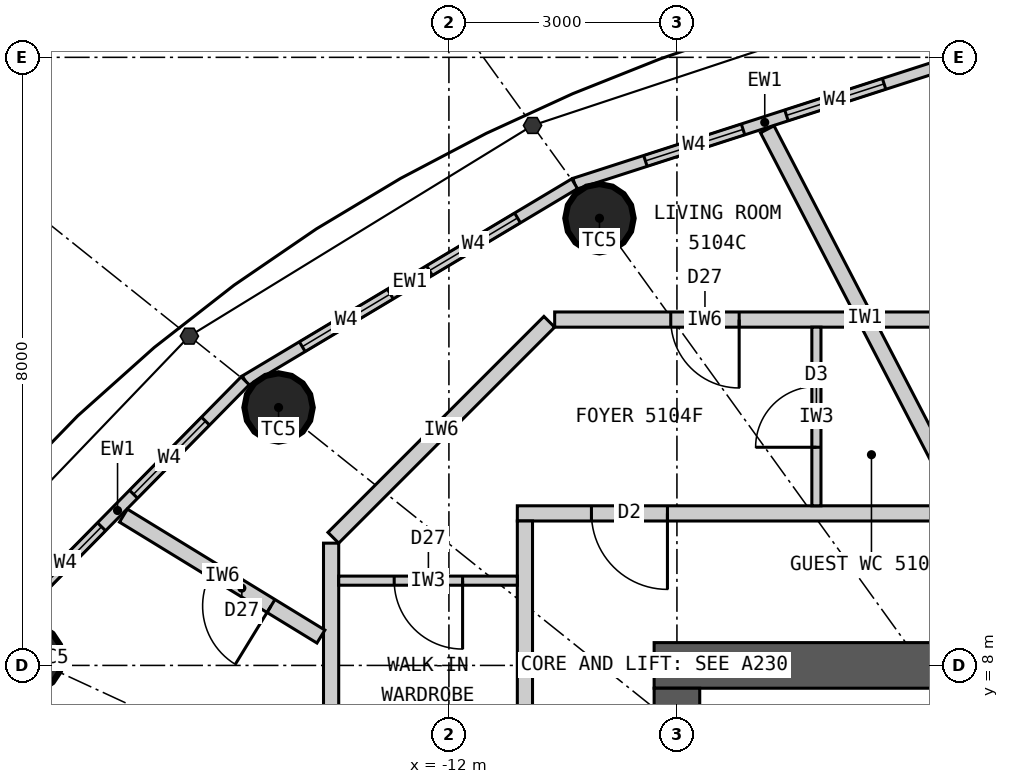
"""IFC4 building model, lengths in metres.
Left out: names, types, materials, properties, quantities, classifications, styles, units other than length and angle.
Written with IfcOpenShell. Run it as: python <this file> out.ifc"""

import sys

from ifc_helpers import new_model, si_unit, direction, frame, frame_2d, origin, origin_2d, place, context, subcontext, project, spatial, rectangle, circle, extrude, element, fill, save


model = new_model("IFC4")
c1 = context("Model", 3, precision=1e-05, world=origin(), true_north=direction((0.0, 1.0)))
c2 = subcontext(c1, "Body", "Model", "MODEL_VIEW")
j1 = project(units=[si_unit("LENGTHUNIT", "METRE"), si_unit("PLANEANGLEUNIT", "RADIAN")], contexts=[c1])
p1 = place(None, origin())
s1 = spatial("IfcSite", under=j1, at=p1, CompositionType="ELEMENT")
p2 = place(p1, origin())
s2 = spatial("IfcBuilding", under=s1, at=p2, CompositionType="ELEMENT")
p3 = place(p2, frame((0.0, 0.0, 192.9)))
s3 = spatial("IfcBuildingStorey", under=s2, at=p3, CompositionType="ELEMENT", Elevation=192.9)
for number, where, z_axis, x_axis in (
    (1, (-10.019, 13.883, 0.0), (0.0, 0.0, 1.0), (1.0, 0.0, 0.0)),
    (2, (-14.241, 11.393, 0.0), (0.0, 0.0, 1.0), (1.0, 0.0, 0.0)),
    (3, (-17.532, 8.098, 0.0), (0.0, 0.0, 1.0), (1.0, 0.0, 0.0)),
):
    element("IfcColumn", number, at=place(p3, frame(where, z_axis=z_axis, x_axis=x_axis)), inside=s3, PredefinedType="COLUMN", context=c2, shape_type="SweptSolid", body=[
        extrude(circle(Radius=0.45, at=origin_2d()), origin(), (0.0, 0.0, 1.0), 3.3),
    ])
p4 = place(p3, frame((-9.3, 8.0, 0.0), z_axis=(0.0, 0.0, 1.0), x_axis=(1.0, 0.0, 0.0)))
e4 = element("IfcWall", 4, at=p4, inside=s3, PredefinedType="SHEAR", context=c2, shape_type="SweptSolid", body=[
    extrude(rectangle(XDim=18.6, YDim=0.6, at=frame_2d((9.3, 0.0))), origin(), (0.0, 0.0, 1.0), 3.3),
])
p5 = place(p4, frame((8.0, 0.0, 0.0)))
e5 = element("IfcOpeningElement", 5, at=p5, cuts=e4, PredefinedType="OPENING", context=c2, shape_type="SweptSolid", body=[
    extrude(rectangle(XDim=1.2, YDim=2.2, at=frame_2d((0.6, 1.1))), frame((0.0, 0.31, 0.0), z_axis=(0.0, -1.0, 0.0), x_axis=(1.0, 0.0, 0.0)), (0.0, 0.0, 1.0), 0.62),
])
p6 = place(p4, frame((15.6, 0.0, 0.0)))
e6 = element("IfcOpeningElement", 6, at=p6, cuts=e4, PredefinedType="OPENING", context=c2, shape_type="SweptSolid", body=[
    extrude(rectangle(XDim=0.9, YDim=2.2, at=frame_2d((0.45, 1.1))), frame((0.0, 0.31, 0.0), z_axis=(0.0, -1.0, 0.0), x_axis=(1.0, 0.0, 0.0)), (0.0, 0.0, 1.0), 0.62),
])
p7 = place(p3, frame((-9.0, 7.7, 0.0), z_axis=(0.0, 0.0, 1.0), x_axis=(0.0, -1.0, 0.0)))
e7 = element("IfcWall", 7, at=p7, inside=s3, PredefinedType="SHEAR", context=c2, shape_type="SweptSolid", body=[
    extrude(rectangle(XDim=15.4, YDim=0.6, at=frame_2d((7.7, 0.0))), origin(), (0.0, 0.0, 1.0), 3.3),
])
p8 = place(p7, frame((6.8, 0.0, 0.0)))
e8 = element("IfcOpeningElement", 8, at=p8, cuts=e7, PredefinedType="OPENING", context=c2, shape_type="SweptSolid", body=[
    extrude(rectangle(XDim=1.8, YDim=2.2, at=frame_2d((0.9, 1.1))), frame((0.0, 0.31, 0.0), z_axis=(0.0, -1.0, 0.0), x_axis=(1.0, 0.0, 0.0)), (0.0, 0.0, 1.0), 0.62),
])
p9 = place(p3, frame((-5.343, 15.952, 0.0), z_axis=(0.0, 0.0, 1.0), x_axis=(-0.951644702515, -0.307200846638, 0.0)))
e9 = element("IfcWall", 9, at=p9, inside=s3, PredefinedType="ELEMENTEDWALL", context=c2, shape_type="SweptSolid", body=[
    extrude(rectangle(XDim=5.258, YDim=0.15, at=frame_2d((2.629, 0.0))), origin(), (0.0, 0.0, 1.0), 3.12),
])
p10 = place(p9, frame((0.979, 0.0, 0.9)))
e10 = element("IfcOpeningElement", 10, at=p10, cuts=e9, PredefinedType="OPENING", context=c2, shape_type="SweptSolid", body=[
    extrude(rectangle(XDim=1.35, YDim=1.9, at=frame_2d((0.675, 0.95))), frame((0.0, 0.085, 0.0), z_axis=(0.0, -1.0, 0.0), x_axis=(1.0, 0.0, 0.0)), (0.0, 0.0, 1.0), 0.17),
])
p11 = place(p9, frame((2.929, 0.0, 0.9)))
e11 = element("IfcOpeningElement", 11, at=p11, cuts=e9, PredefinedType="OPENING", context=c2, shape_type="SweptSolid", body=[
    extrude(rectangle(XDim=1.35, YDim=1.9, at=frame_2d((0.675, 0.95))), frame((0.0, 0.085, 0.0), z_axis=(0.0, -1.0, 0.0), x_axis=(1.0, 0.0, 0.0)), (0.0, 0.0, 1.0), 0.17),
])
p12 = place(p3, frame((-10.346, 14.336, 0.0), z_axis=(0.0, 0.0, 1.0), x_axis=(-0.85822150553, -0.513279502265, 0.0)))
e12 = element("IfcWall", 12, at=p12, inside=s3, PredefinedType="ELEMENTEDWALL", context=c2, shape_type="SweptSolid", body=[
    extrude(rectangle(XDim=5.05, YDim=0.15, at=frame_2d((2.525, 0.0))), origin(), (0.0, 0.0, 1.0), 3.12),
])
p13 = place(p12, frame((0.875, 0.0, 0.9)))
e13 = element("IfcOpeningElement", 13, at=p13, cuts=e12, PredefinedType="OPENING", context=c2, shape_type="SweptSolid", body=[
    extrude(rectangle(XDim=1.35, YDim=1.9, at=frame_2d((0.675, 0.95))), frame((0.0, 0.085, 0.0), z_axis=(0.0, -1.0, 0.0), x_axis=(1.0, 0.0, 0.0)), (0.0, 0.0, 1.0), 0.17),
])
p14 = place(p12, frame((2.825, 0.0, 0.9)))
e14 = element("IfcOpeningElement", 14, at=p14, cuts=e12, PredefinedType="OPENING", context=c2, shape_type="SweptSolid", body=[
    extrude(rectangle(XDim=1.35, YDim=1.9, at=frame_2d((0.675, 0.95))), frame((0.0, 0.085, 0.0), z_axis=(0.0, -1.0, 0.0), x_axis=(1.0, 0.0, 0.0)), (0.0, 0.0, 1.0), 0.17),
])
p15 = place(p3, frame((-14.68, 11.744, 0.0), z_axis=(0.0, 0.0, 1.0), x_axis=(-0.701527379618, -0.712642501993, 0.0)))
e15 = element("IfcWall", 15, at=p15, inside=s3, PredefinedType="ELEMENTEDWALL", context=c2, shape_type="SweptSolid", body=[
    extrude(rectangle(XDim=4.788, YDim=0.15, at=frame_2d((2.394, 0.0))), origin(), (0.0, 0.0, 1.0), 3.12),
])
p16 = place(p15, frame((0.744, 0.0, 0.9)))
e16 = element("IfcOpeningElement", 16, at=p16, cuts=e15, PredefinedType="OPENING", context=c2, shape_type="SweptSolid", body=[
    extrude(rectangle(XDim=1.35, YDim=1.9, at=frame_2d((0.675, 0.95))), frame((0.0, 0.085, 0.0), z_axis=(0.0, -1.0, 0.0), x_axis=(1.0, 0.0, 0.0)), (0.0, 0.0, 1.0), 0.17),
])
p17 = place(p15, frame((2.694, 0.0, 0.9)))
e17 = element("IfcOpeningElement", 17, at=p17, cuts=e15, PredefinedType="OPENING", context=c2, shape_type="SweptSolid", body=[
    extrude(rectangle(XDim=1.35, YDim=1.9, at=frame_2d((0.675, 0.95))), frame((0.0, 0.085, 0.0), z_axis=(0.0, -1.0, 0.0), x_axis=(1.0, 0.0, 0.0)), (0.0, 0.0, 1.0), 0.17),
])
p18 = place(p3, frame((-11.1, 10.0, 0.0), z_axis=(0.0, 0.0, 1.0), x_axis=(1.0, 0.0, 0.0)))
e18 = element("IfcWall", 18, at=p18, inside=s3, PredefinedType="PARTITIONING", context=c2, shape_type="SweptSolid", body=[
    extrude(rectangle(XDim=22.2, YDim=0.2, at=frame_2d((11.1, 0.0))), origin(), (0.0, 0.0, 1.0), 3.12),
])
p19 = place(p18, frame((11.36, 0.0, 0.0)))
e19 = element("IfcOpeningElement", 19, at=p19, cuts=e18, PredefinedType="OPENING", context=c2, shape_type="SweptSolid", body=[
    extrude(rectangle(XDim=1.0, YDim=2.2, at=frame_2d((0.5, 1.1))), frame((0.0, 0.11, 0.0), z_axis=(0.0, -1.0, 0.0), x_axis=(1.0, 0.0, 0.0)), (0.0, 0.0, 1.0), 0.22),
])
p20 = place(p18, frame((0.975, 0.0, 0.0)))
e20 = element("IfcOpeningElement", 20, at=p20, cuts=e18, PredefinedType="OPENING", context=c2, shape_type="SweptSolid", body=[
    extrude(rectangle(XDim=1.0, YDim=2.2, at=frame_2d((0.5, 1.1))), frame((0.0, 0.11, 0.0), z_axis=(0.0, -1.0, 0.0), x_axis=(1.0, 0.0, 0.0)), (0.0, 0.0, 1.0), 0.22),
])
p21 = place(p3, frame((-11.0, 9.9, 0.0), z_axis=(0.0, 0.0, 1.0), x_axis=(0.0, -1.0, 0.0)))
e21 = element("IfcWall", 21, at=p21, inside=s3, PredefinedType="PARTITIONING", context=c2, shape_type="SweptSolid", body=[
    extrude(rectangle(XDim=19.8, YDim=0.2, at=frame_2d((9.9, 0.0))), origin(), (0.0, 0.0, 1.0), 3.12),
])
p22 = place(p21, frame((9.495, 0.0, 0.0)))
e22 = element("IfcOpeningElement", 22, at=p22, cuts=e21, PredefinedType="OPENING", context=c2, shape_type="SweptSolid", body=[
    extrude(rectangle(XDim=1.0, YDim=2.2, at=frame_2d((0.5, 1.1))), frame((0.0, 0.11, 0.0), z_axis=(0.0, -1.0, 0.0), x_axis=(1.0, 0.0, 0.0)), (0.0, 0.0, 1.0), 0.22),
])
p23 = place(p3, frame((-5.241, 10.1, 0.0), z_axis=(0.0, 0.0, 1.0), x_axis=(-0.460603196597, 0.887606160008, 0.0)))
e23 = element("IfcWall", 23, at=p23, inside=s3, PredefinedType="PARTITIONING", context=c2, shape_type="SweptSolid", body=[
    extrude(rectangle(XDim=5.58, YDim=0.2, at=frame_2d((2.79, 0.0))), origin(), (0.0, 0.0, 1.0), 3.12),
])
p24 = place(p3, frame((4.082, 12.55, 0.0), z_axis=(0.0, 0.0, 1.0), x_axis=(-1.0, 0.0, 0.0)))
e24 = element("IfcWall", 24, at=p24, inside=s3, PredefinedType="PARTITIONING", context=c2, shape_type="SweptSolid", body=[
    extrude(rectangle(XDim=10.446, YDim=0.2, at=frame_2d((5.223, 0.0))), origin(), (0.0, 0.0, 1.0), 3.12),
])
p25 = place(p24, frame((6.757, 0.0, 0.0)))
e25 = element("IfcOpeningElement", 25, at=p25, cuts=e24, PredefinedType="OPENING", context=c2, shape_type="SweptSolid", body=[
    extrude(rectangle(XDim=0.8, YDim=2.1, at=frame_2d((0.4, 1.05))), frame((0.0, 0.11, 0.0), z_axis=(0.0, -1.0, 0.0), x_axis=(1.0, 0.0, 0.0)), (0.0, 0.0, 1.0), 0.22),
])
p26 = place(p24, frame((3.372, 0.0, 0.0)))
e26 = element("IfcOpeningElement", 26, at=p26, cuts=e24, PredefinedType="OPENING", context=c2, shape_type="SweptSolid", body=[
    extrude(rectangle(XDim=0.9, YDim=2.1, at=frame_2d((0.45, 1.05))), frame((0.0, 0.11, 0.0), z_axis=(0.0, -1.0, 0.0), x_axis=(1.0, 0.0, 0.0)), (0.0, 0.0, 1.0), 0.22),
])
p27 = place(p3, frame((-6.661, 12.55, 0.0), z_axis=(0.0, 0.0, 1.0), x_axis=(-1.0, 0.0, 0.0)))
e27 = element("IfcWall", 27, at=p27, inside=s3, PredefinedType="PARTITIONING", context=c2, shape_type="SweptSolid", body=[
    extrude(rectangle(XDim=3.947, YDim=0.2, at=frame_2d((1.974, 0.0))), origin(), (0.0, 0.0, 1.0), 3.12),
])
p28 = place(p27, frame((1.52, 0.0, 0.0)))
e28 = element("IfcOpeningElement", 28, at=p28, cuts=e27, PredefinedType="OPENING", context=c2, shape_type="SweptSolid", body=[
    extrude(rectangle(XDim=0.9, YDim=2.1, at=frame_2d((0.45, 1.05))), frame((0.0, 0.11, 0.0), z_axis=(0.0, -1.0, 0.0), x_axis=(1.0, 0.0, 0.0)), (0.0, 0.0, 1.0), 0.22),
])
p29 = place(p3, frame((-10.679, 12.521, 0.0), z_axis=(0.0, 0.0, 1.0), x_axis=(-0.707106781187, -0.707106781187, 0.0)))
e29 = element("IfcWall", 29, at=p29, inside=s3, PredefinedType="PARTITIONING", context=c2, shape_type="SweptSolid", body=[
    extrude(rectangle(XDim=4.019, YDim=0.2, at=frame_2d((2.009, 0.0))), origin(), (0.0, 0.0, 1.0), 3.12),
])
p30 = place(p3, frame((-13.55, 9.609, 0.0), z_axis=(0.0, 0.0, 1.0), x_axis=(0.0, -1.0, 0.0)))
e30 = element("IfcWall", 30, at=p30, inside=s3, PredefinedType="PARTITIONING", context=c2, shape_type="SweptSolid", body=[
    extrude(rectangle(XDim=6.596, YDim=0.2, at=frame_2d((3.298, 0.0))), origin(), (0.0, 0.0, 1.0), 3.12),
])
p31 = place(p30, frame((3.697, 0.0, 0.0)))
e31 = element("IfcOpeningElement", 31, at=p31, cuts=e30, PredefinedType="OPENING", context=c2, shape_type="SweptSolid", body=[
    extrude(rectangle(XDim=0.8, YDim=2.1, at=frame_2d((0.4, 1.05))), frame((0.0, 0.11, 0.0), z_axis=(0.0, -1.0, 0.0), x_axis=(1.0, 0.0, 0.0)), (0.0, 0.0, 1.0), 0.22),
])
p32 = place(p3, frame((-13.684, 8.38, 0.0), z_axis=(0.0, 0.0, 1.0), x_axis=(-0.852784302627, 0.522263279576, 0.0)))
e32 = element("IfcWall", 32, at=p32, inside=s3, PredefinedType="PARTITIONING", context=c2, shape_type="SweptSolid", body=[
    extrude(rectangle(XDim=3.047, YDim=0.2, at=frame_2d((1.523, 0.0))), origin(), (0.0, 0.0, 1.0), 3.12),
])
p33 = place(p32, frame((0.77, 0.0, 0.0)))
e33 = element("IfcOpeningElement", 33, at=p33, cuts=e32, PredefinedType="OPENING", context=c2, shape_type="SweptSolid", body=[
    extrude(rectangle(XDim=0.9, YDim=2.1, at=frame_2d((0.45, 1.05))), frame((0.0, 0.11, 0.0), z_axis=(0.0, -1.0, 0.0), x_axis=(1.0, 0.0, 0.0)), (0.0, 0.0, 1.0), 0.22),
])
p34 = place(p3, frame((-7.165, 10.1, 0.0), z_axis=(0.0, 0.0, 1.0), x_axis=(0.0, 1.0, 0.0)))
e34 = element("IfcWall", 34, at=p34, inside=s3, PredefinedType="PARTITIONING", context=c2, shape_type="SweptSolid", body=[
    extrude(rectangle(XDim=2.35, YDim=0.12, at=frame_2d((1.175, 0.0))), origin(), (0.0, 0.0, 1.0), 3.12),
])
p35 = place(p34, frame((0.77, 0.0, 0.0)))
e35 = element("IfcOpeningElement", 35, at=p35, cuts=e34, PredefinedType="OPENING", context=c2, shape_type="SweptSolid", body=[
    extrude(rectangle(XDim=0.8, YDim=2.1, at=frame_2d((0.4, 1.05))), frame((0.0, 0.07, 0.0), z_axis=(0.0, -1.0, 0.0), x_axis=(1.0, 0.0, 0.0)), (0.0, 0.0, 1.0), 0.14),
])
p36 = place(p3, frame((-11.1, 9.115, 0.0), z_axis=(0.0, 0.0, 1.0), x_axis=(-1.0, 0.0, 0.0)))
e36 = element("IfcWall", 36, at=p36, inside=s3, PredefinedType="PARTITIONING", context=c2, shape_type="SweptSolid", body=[
    extrude(rectangle(XDim=2.35, YDim=0.12, at=frame_2d((1.175, 0.0))), origin(), (0.0, 0.0, 1.0), 3.12),
])
p37 = place(p36, frame((0.72, 0.0, 0.0)))
e37 = element("IfcOpeningElement", 37, at=p37, cuts=e36, PredefinedType="OPENING", context=c2, shape_type="SweptSolid", body=[
    extrude(rectangle(XDim=0.9, YDim=2.1, at=frame_2d((0.45, 1.05))), frame((0.0, 0.07, 0.0), z_axis=(0.0, -1.0, 0.0), x_axis=(1.0, 0.0, 0.0)), (0.0, 0.0, 1.0), 0.14),
])
p38 = place(p10, origin())
e38 = element("IfcWindow", 38, at=p38, inside=s3, PartitioningType="SINGLE_PANEL", PredefinedType="WINDOW", context=c2, shape_type="SweptSolid", body=[
    extrude(rectangle(XDim=1.35, YDim=1.9, at=frame_2d((0.675, 0.95))), frame((0.0, 0.03, 0.0), z_axis=(0.0, -1.0, 0.0), x_axis=(1.0, 0.0, 0.0)), (0.0, 0.0, 1.0), 0.06),
])
fill(e10, e38)
p39 = place(p11, origin())
e39 = element("IfcWindow", 39, at=p39, inside=s3, PartitioningType="SINGLE_PANEL", PredefinedType="WINDOW", context=c2, shape_type="SweptSolid", body=[
    extrude(rectangle(XDim=1.35, YDim=1.9, at=frame_2d((0.675, 0.95))), frame((0.0, 0.03, 0.0), z_axis=(0.0, -1.0, 0.0), x_axis=(1.0, 0.0, 0.0)), (0.0, 0.0, 1.0), 0.06),
])
fill(e11, e39)
p40 = place(p13, origin())
e40 = element("IfcWindow", 40, at=p40, inside=s3, PartitioningType="SINGLE_PANEL", PredefinedType="WINDOW", context=c2, shape_type="SweptSolid", body=[
    extrude(rectangle(XDim=1.35, YDim=1.9, at=frame_2d((0.675, 0.95))), frame((0.0, 0.03, 0.0), z_axis=(0.0, -1.0, 0.0), x_axis=(1.0, 0.0, 0.0)), (0.0, 0.0, 1.0), 0.06),
])
fill(e13, e40)
p41 = place(p14, origin())
e41 = element("IfcWindow", 41, at=p41, inside=s3, PartitioningType="SINGLE_PANEL", PredefinedType="WINDOW", context=c2, shape_type="SweptSolid", body=[
    extrude(rectangle(XDim=1.35, YDim=1.9, at=frame_2d((0.675, 0.95))), frame((0.0, 0.03, 0.0), z_axis=(0.0, -1.0, 0.0), x_axis=(1.0, 0.0, 0.0)), (0.0, 0.0, 1.0), 0.06),
])
fill(e14, e41)
p42 = place(p16, origin())
e42 = element("IfcWindow", 42, at=p42, inside=s3, PartitioningType="SINGLE_PANEL", PredefinedType="WINDOW", context=c2, shape_type="SweptSolid", body=[
    extrude(rectangle(XDim=1.35, YDim=1.9, at=frame_2d((0.675, 0.95))), frame((0.0, 0.03, 0.0), z_axis=(0.0, -1.0, 0.0), x_axis=(1.0, 0.0, 0.0)), (0.0, 0.0, 1.0), 0.06),
])
fill(e16, e42)
p43 = place(p17, origin())
e43 = element("IfcWindow", 43, at=p43, inside=s3, PartitioningType="SINGLE_PANEL", PredefinedType="WINDOW", context=c2, shape_type="SweptSolid", body=[
    extrude(rectangle(XDim=1.35, YDim=1.9, at=frame_2d((0.675, 0.95))), frame((0.0, 0.03, 0.0), z_axis=(0.0, -1.0, 0.0), x_axis=(1.0, 0.0, 0.0)), (0.0, 0.0, 1.0), 0.06),
])
fill(e17, e43)
p44 = place(p20, origin())
e44 = element("IfcDoor", 44, at=p44, inside=s3, OperationType="SINGLE_SWING_RIGHT", PredefinedType="DOOR", context=c2, shape_type="SweptSolid", body=[
    extrude(rectangle(XDim=1.0, YDim=2.2, at=frame_2d((0.5, 1.1))), frame((0.0, 0.025, 0.0), z_axis=(0.0, -1.0, 0.0), x_axis=(1.0, 0.0, 0.0)), (0.0, 0.0, 1.0), 0.05),
])
fill(e20, e44)
p45 = place(p35, origin())
e45 = element("IfcDoor", 45, at=p45, inside=s3, OperationType="SINGLE_SWING_LEFT", PredefinedType="DOOR", context=c2, shape_type="SweptSolid", body=[
    extrude(rectangle(XDim=0.8, YDim=2.1, at=frame_2d((0.4, 1.05))), frame((0.0, 0.025, 0.0), z_axis=(0.0, -1.0, 0.0), x_axis=(1.0, 0.0, 0.0)), (0.0, 0.0, 1.0), 0.05),
])
fill(e35, e45)
p46 = place(p37, origin())
e46 = element("IfcDoor", 46, at=p46, inside=s3, OperationType="SINGLE_SWING_LEFT", PredefinedType="DOOR", context=c2, shape_type="SweptSolid", body=[
    extrude(rectangle(XDim=0.9, YDim=2.1, at=frame_2d((0.45, 1.05))), frame((0.0, 0.025, 0.0), z_axis=(0.0, -1.0, 0.0), x_axis=(1.0, 0.0, 0.0)), (0.0, 0.0, 1.0), 0.05),
])
fill(e37, e46)
p47 = place(p28, origin())
e47 = element("IfcDoor", 47, at=p47, inside=s3, OperationType="SINGLE_SWING_LEFT", PredefinedType="DOOR", context=c2, shape_type="SweptSolid", body=[
    extrude(rectangle(XDim=0.9, YDim=2.1, at=frame_2d((0.45, 1.05))), frame((0.0, 0.025, 0.0), z_axis=(0.0, -1.0, 0.0), x_axis=(1.0, 0.0, 0.0)), (0.0, 0.0, 1.0), 0.05),
])
fill(e28, e47)
p48 = place(p33, origin())
e48 = element("IfcDoor", 48, at=p48, inside=s3, OperationType="SINGLE_SWING_LEFT", PredefinedType="DOOR", context=c2, shape_type="SweptSolid", body=[
    extrude(rectangle(XDim=0.9, YDim=2.1, at=frame_2d((0.45, 1.05))), frame((0.0, 0.025, 0.0), z_axis=(0.0, -1.0, 0.0), x_axis=(1.0, 0.0, 0.0)), (0.0, 0.0, 1.0), 0.05),
])
fill(e33, e48)
save(model, sys.argv[1])
